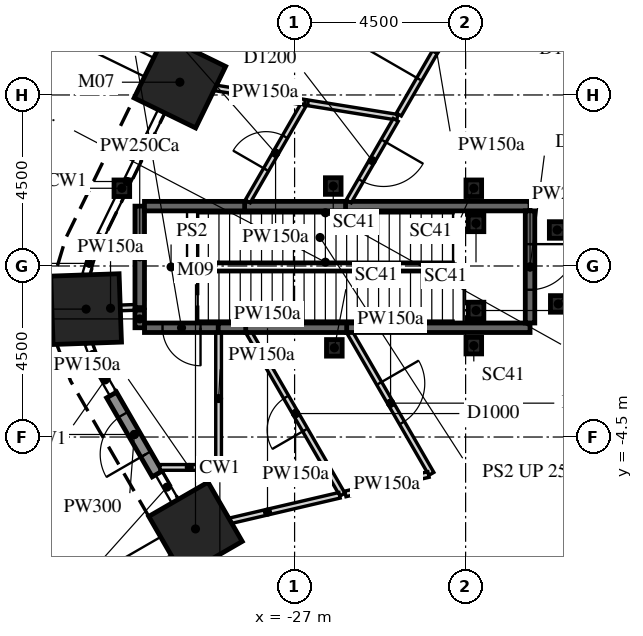
"""IFC4 building model, lengths in metres.
Left out: names, types, materials, properties, quantities, classifications, styles, units other than length and angle.
Written with IfcOpenShell. Run it as: python <this file> out.ifc"""

import sys

from ifc_helpers import new_model, si_unit, direction, frame, frame_2d, origin, origin_2d, place, context, subcontext, project, spatial, rectangle, i_section, extrude, element, fill, save


model = new_model("IFC4")
c1 = context("Model", 3, precision=1e-05, world=origin(), true_north=direction((0.0, 1.0)))
c2 = subcontext(c1, "Body", "Model", "MODEL_VIEW")
j1 = project(units=[si_unit("LENGTHUNIT", "METRE"), si_unit("PLANEANGLEUNIT", "RADIAN")], contexts=[c1])
p1 = place(None, origin())
s1 = spatial("IfcSite", under=j1, at=p1, CompositionType="ELEMENT")
p2 = place(p1, origin())
s2 = spatial("IfcBuilding", under=s1, at=p2, CompositionType="ELEMENT")
p3 = place(p2, origin())
s3 = spatial("IfcBuildingStorey", under=s2, at=p3, CompositionType="ELEMENT", Elevation=0.0)
for number, where, z_axis, x_axis in (
    (1, (-30.018, 4.836, -2.1), (0.0, 0.0, 1.0), (0.438, 0.899, 0.0)),
    (2, (-32.486, -1.135, -2.1), (0.0, 0.0, 1.0), (-0.035, 0.999, 0.0)),
    (3, (-29.608, -6.918, -2.1), (0.0, 0.0, 1.0), (-0.5, 0.866, 0.0)),
):
    element("IfcColumn", number, at=place(p3, frame(where, z_axis=z_axis, x_axis=x_axis)), inside=s3, PredefinedType="COLUMN", context=c2, shape_type="SweptSolid", body=[
        extrude(rectangle(XDim=1.8, YDim=1.8, at=origin_2d()), origin(), (0.0, 0.0, 1.0), 10.85),
    ])
for number, where, z_axis, x_axis in (
    (4, (-25.954, -2.154, -2.1), (0.0, 0.0, 1.0), (1.0, 0.0, 0.0)),
    (5, (-31.545, 2.045, -2.1), (0.0, 0.0, 1.0), (1.0, 0.0, 0.0)),
    (6, (-25.983, 2.104, -2.1), (0.0, 0.0, 1.0), (1.0, 0.0, 0.0)),
    (7, (-20.091, 0.948, -2.1), (0.0, 0.0, 1.0), (1.0, 0.0, 0.0)),
    (8, (-22.226, 1.121, -2.1), (0.0, 0.0, 1.0), (1.0, 0.0, 0.0)),
    (9, (-22.226, -1.171, -2.1), (0.0, 0.0, 1.0), (1.0, 0.0, 0.0)),
    (10, (-20.062, -0.998, -2.1), (0.0, 0.0, 1.0), (1.0, 0.0, 0.0)),
    (11, (-22.285, 2.045, -2.1), (0.0, 0.0, 1.0), (1.0, 0.0, 0.0)),
    (12, (-22.285, -2.095, -2.1), (0.0, 0.0, 1.0), (1.0, 0.0, 0.0)),
):
    element("IfcColumn", number, at=place(p3, frame(where, z_axis=z_axis, x_axis=x_axis)), inside=s3, PredefinedType="COLUMN", context=c2, shape_type="SweptSolid", body=[
        extrude(i_section(OverallWidth=0.412, OverallDepth=0.437, WebThickness=0.036, FlangeThickness=0.058, FilletRadius=0.015, at=origin_2d()), origin(), (0.0, 0.0, 1.0), 10.85),
    ])
p4 = place(p3, frame((-30.615, -5.472, 0.0), z_axis=(0.0, 0.0, 1.0), x_axis=(-0.500001309137, 0.866024647952, 0.0)))
e13 = element("IfcWall", 13, at=p4, inside=s3, PredefinedType="SOLIDWALL", context=c2, shape_type="SweptSolid", body=[
    extrude(rectangle(XDim=2.4, YDim=0.3, at=frame_2d((1.2, 0.0))), origin(), (0.0, 0.0, 1.0), 7.823),
])
p5 = place(p4, frame((0.6, 0.0, 0.0)))
e14 = element("IfcOpeningElement", 14, at=p5, cuts=e13, PredefinedType="OPENING", context=c2, shape_type="SweptSolid", body=[
    extrude(rectangle(XDim=1.2, YDim=2.1, at=frame_2d((0.6, 1.05))), frame((0.0, 0.16, 0.0), z_axis=(0.0, -1.0, 0.0), x_axis=(1.0, 0.0, 0.0)), (0.0, 0.0, 1.0), 0.32),
])
p6 = place(p3, frame((-32.486, -1.134, 0.0), z_axis=(0.0, 0.0, 1.0), x_axis=(0.99939717978, 0.034717100209, 0.0)))
e15 = element("IfcWall", 15, at=p6, inside=s3, PredefinedType="PARTITIONING", context=c2, shape_type="SweptSolid", body=[
    extrude(rectangle(XDim=1.287, YDim=0.15, at=frame_2d((0.644, 0.0))), origin(), (0.0, 0.0, 1.0), 8.75),
])
p7 = place(p3, frame((-29.0, -1.625, 0.0), z_axis=(0.0, 0.0, 1.0), x_axis=(-1.0, 0.0, 0.0)))
e16 = element("IfcWall", 16, at=p7, inside=s3, PredefinedType="PARTITIONING", context=c2, shape_type="SweptSolid", body=[
    extrude(rectangle(XDim=1.95, YDim=0.25, at=frame_2d((0.975, 0.0))), origin(), (0.0, 0.0, 1.0), 8.75),
])
p8 = place(p7, frame((0.475, 0.0, 0.0)))
e17 = element("IfcOpeningElement", 17, at=p8, cuts=e16, PredefinedType="OPENING", context=c2, shape_type="SweptSolid", body=[
    extrude(rectangle(XDim=1.0, YDim=2.1, at=frame_2d((0.5, 1.05))), frame((0.0, 0.135, 0.0), z_axis=(0.0, -1.0, 0.0), x_axis=(1.0, 0.0, 0.0)), (0.0, 0.0, 1.0), 0.27),
])
p9 = place(p3, frame((-31.075, -1.095, 0.0), z_axis=(0.0, 0.0, 1.0), x_axis=(0.0, 1.0, 0.0)))
e18 = element("IfcWall", 18, at=p9, inside=s3, PredefinedType="PARTITIONING", context=c2, shape_type="SweptSolid", body=[
    extrude(rectangle(XDim=2.67, YDim=0.25, at=frame_2d((1.335, 0.0))), origin(), (0.0, 0.0, 1.0), 8.75),
])
p10 = place(p3, frame((-31.075, -1.16, 0.0), z_axis=(0.0, 0.0, 1.0), x_axis=(0.0, -1.0, 0.0)))
e19 = element("IfcWall", 19, at=p10, inside=s3, PredefinedType="PARTITIONING", context=c2, shape_type="SweptSolid", body=[
    extrude(rectangle(XDim=0.465, YDim=0.25, at=frame_2d((0.232, 0.0))), origin(), (0.0, 0.0, 1.0), 8.75),
])
p11 = place(p3, frame((-30.95, 1.575, 0.0), z_axis=(0.0, 0.0, 1.0), x_axis=(1.0, 0.0, 0.0)))
e20 = element("IfcWall", 20, at=p11, inside=s3, PredefinedType="PARTITIONING", context=c2, shape_type="SweptSolid", body=[
    extrude(rectangle(XDim=2.657, YDim=0.25, at=frame_2d((1.329, 0.0))), origin(), (0.0, 0.0, 1.0), 8.75),
])
p12 = place(p3, frame((-30.018, 4.836, 0.0), z_axis=(0.0, 0.0, 1.0), x_axis=(0.987270453079, -0.159050471478, 0.0)))
e21 = element("IfcWall", 21, at=p12, inside=s3, PredefinedType="PARTITIONING", context=c2, shape_type="SweptSolid", body=[
    extrude(rectangle(XDim=3.333, YDim=0.15, at=frame_2d((1.666, 0.0))), origin(), (0.0, 0.0, 1.0), 8.75),
])
p13 = place(p3, frame((-29.0, -5.3, 0.0), z_axis=(0.0, 0.0, 1.0), x_axis=(-1.0, 0.0, 0.0)))
e22 = element("IfcWall", 22, at=p13, inside=s3, PredefinedType="PARTITIONING", context=c2, shape_type="SweptSolid", body=[
    extrude(rectangle(XDim=1.542, YDim=0.15, at=frame_2d((0.771, 0.0))), origin(), (0.0, 0.0, 1.0), 8.75),
])
p14 = place(p3, frame((-29.0, -1.75, 0.0), z_axis=(0.0, 0.0, 1.0), x_axis=(0.0, -1.0, 0.0)))
e23 = element("IfcWall", 23, at=p14, inside=s3, PredefinedType="PARTITIONING", context=c2, shape_type="SweptSolid", body=[
    extrude(rectangle(XDim=3.475, YDim=0.15, at=frame_2d((1.738, 0.0))), origin(), (0.0, 0.0, 1.0), 8.75),
])
p15 = place(p3, frame((-28.315, 1.575, 0.0), z_axis=(0.0, 0.0, 1.0), x_axis=(1.0, 0.0, 0.0)))
e24 = element("IfcWall", 24, at=p15, inside=s3, PredefinedType="PARTITIONING", context=c2, shape_type="SweptSolid", body=[
    extrude(rectangle(XDim=2.678, YDim=0.25, at=frame_2d((1.339, 0.0))), origin(), (0.0, 0.0, 1.0), 8.75),
])
p16 = place(p3, frame((-25.741, -6.015, 0.0), z_axis=(0.0, 0.0, 1.0), x_axis=(-0.500084325422, 0.865976713005, 0.0)))
e25 = element("IfcWall", 25, at=p16, inside=s3, PredefinedType="PARTITIONING", context=c2, shape_type="SweptSolid", body=[
    extrude(rectangle(XDim=4.925, YDim=0.15, at=frame_2d((2.462, 0.0))), origin(), (0.0, 0.0, 1.0), 8.75),
])
p17 = place(p16, frame((1.962, 0.0, 0.0)))
e26 = element("IfcOpeningElement", 26, at=p17, cuts=e25, PredefinedType="OPENING", context=c2, shape_type="SweptSolid", body=[
    extrude(rectangle(XDim=1.0, YDim=2.1, at=frame_2d((0.5, 1.05))), frame((0.0, 0.085, 0.0), z_axis=(0.0, -1.0, 0.0), x_axis=(1.0, 0.0, 0.0)), (0.0, 0.0, 1.0), 0.17),
])
p18 = place(p3, frame((-28.264, -1.625, 0.0), z_axis=(0.0, 0.0, 1.0), x_axis=(-1.0, 0.0, 0.0)))
e27 = element("IfcWall", 27, at=p18, inside=s3, PredefinedType="PARTITIONING", context=c2, shape_type="SweptSolid", body=[
    extrude(rectangle(XDim=0.746, YDim=0.25, at=frame_2d((0.373, 0.0))), origin(), (0.0, 0.0, 1.0), 8.75),
])
p19 = place(p3, frame((-28.233, 1.7, 0.0), z_axis=(0.0, 0.0, 1.0), x_axis=(0.500083180475, 0.865977374189, 0.0)))
e28 = element("IfcWall", 28, at=p19, inside=s3, PredefinedType="PARTITIONING", context=c2, shape_type="SweptSolid", body=[
    extrude(rectangle(XDim=2.929, YDim=0.15, at=frame_2d((1.465, 0.0))), origin(), (0.0, 0.0, 1.0), 8.75),
])
p20 = place(p19, frame((0.965, 0.0, 0.0)))
e29 = element("IfcOpeningElement", 29, at=p20, cuts=e28, PredefinedType="OPENING", context=c2, shape_type="SweptSolid", body=[
    extrude(rectangle(XDim=1.0, YDim=2.1, at=frame_2d((0.5, 1.05))), frame((0.0, 0.085, 0.0), z_axis=(0.0, -1.0, 0.0), x_axis=(1.0, 0.0, 0.0)), (0.0, 0.0, 1.0), 0.17),
])
p21 = place(p3, frame((-26.649, 4.293, 0.0), z_axis=(0.0, 0.0, 1.0), x_axis=(0.987239560751, -0.159242110287, 0.0)))
e30 = element("IfcWall", 30, at=p21, inside=s3, PredefinedType="PARTITIONING", context=c2, shape_type="SweptSolid", body=[
    extrude(rectangle(XDim=2.381, YDim=0.15, at=frame_2d((1.19, 0.0))), origin(), (0.0, 0.0, 1.0), 8.75),
])
p22 = place(p3, frame((-25.817, -6.033, 0.0), z_axis=(0.0, 0.0, 1.0), x_axis=(-0.973795851952, -0.227423918535, 0.0)))
e31 = element("IfcWall", 31, at=p22, inside=s3, PredefinedType="PARTITIONING", context=c2, shape_type="SweptSolid", body=[
    extrude(rectangle(XDim=3.893, YDim=0.15, at=frame_2d((1.946, 0.0))), origin(), (0.0, 0.0, 1.0), 8.75),
])
p23 = place(p3, frame((-25.659, 1.575, 0.0), z_axis=(0.0, 0.0, 1.0), x_axis=(1.0, 0.0, 0.0)))
e32 = element("IfcWall", 32, at=p23, inside=s3, PredefinedType="PARTITIONING", context=c2, shape_type="SweptSolid", body=[
    extrude(rectangle(XDim=4.854, YDim=0.25, at=frame_2d((2.427, 0.0))), origin(), (0.0, 0.0, 1.0), 8.75),
])
p24 = place(p3, frame((-25.548, -1.75, 0.0), z_axis=(0.0, 0.0, 1.0), x_axis=(0.500065367758, -0.865987660403, 0.0)))
e33 = element("IfcWall", 33, at=p24, inside=s3, PredefinedType="PARTITIONING", context=c2, shape_type="SweptSolid", body=[
    extrude(rectangle(XDim=4.293, YDim=0.15, at=frame_2d((2.147, 0.0))), origin(), (0.0, 0.0, 1.0), 8.75),
])
p25 = place(p24, frame((1.547, 0.0, 0.0)))
e34 = element("IfcOpeningElement", 34, at=p25, cuts=e33, PredefinedType="OPENING", context=c2, shape_type="SweptSolid", body=[
    extrude(rectangle(XDim=1.2, YDim=2.1, at=frame_2d((0.6, 1.05))), frame((0.0, 0.085, 0.0), z_axis=(0.0, -1.0, 0.0), x_axis=(1.0, 0.0, 0.0)), (0.0, 0.0, 1.0), 0.17),
])
p26 = place(p3, frame((-25.608, -1.625, 0.0), z_axis=(0.0, 0.0, 1.0), x_axis=(-1.0, 0.0, 0.0)))
e35 = element("IfcWall", 35, at=p26, inside=s3, PredefinedType="PARTITIONING", context=c2, shape_type="SweptSolid", body=[
    extrude(rectangle(XDim=2.678, YDim=0.25, at=frame_2d((1.339, 0.0))), origin(), (0.0, 0.0, 1.0), 8.75),
])
p27 = place(p3, frame((-24.338, 3.844, 0.0), z_axis=(0.0, 0.0, 1.0), x_axis=(-0.500188907164, -0.865916310708, 0.0)))
e36 = element("IfcWall", 36, at=p27, inside=s3, PredefinedType="PARTITIONING", context=c2, shape_type="SweptSolid", body=[
    extrude(rectangle(XDim=2.477, YDim=0.15, at=frame_2d((1.238, 0.0))), origin(), (0.0, 0.0, 1.0), 8.75),
])
p28 = place(p27, frame((0.638, 0.0, 0.0)))
e37 = element("IfcOpeningElement", 37, at=p28, cuts=e36, PredefinedType="OPENING", context=c2, shape_type="SweptSolid", body=[
    extrude(rectangle(XDim=1.2, YDim=2.1, at=frame_2d((0.6, 1.05))), frame((0.0, 0.085, 0.0), z_axis=(0.0, -1.0, 0.0), x_axis=(1.0, 0.0, 0.0)), (0.0, 0.0, 1.0), 0.17),
])
p29 = place(p3, frame((-23.477, -5.486, 0.0), z_axis=(0.0, 0.0, 1.0), x_axis=(-0.97376098573, -0.227573158942, 0.0)))
e38 = element("IfcWall", 38, at=p29, inside=s3, PredefinedType="PARTITIONING", context=c2, shape_type="SweptSolid", body=[
    extrude(rectangle(XDim=2.246, YDim=0.15, at=frame_2d((1.123, 0.0))), origin(), (0.0, 0.0, 1.0), 8.75),
])
p30 = place(p3, frame((-24.258, 3.983, 0.0), z_axis=(0.0, 0.0, 1.0), x_axis=(0.500095273167, 0.865970390808, 0.0)))
e39 = element("IfcWall", 39, at=p30, inside=s3, PredefinedType="PARTITIONING", context=c2, shape_type="SweptSolid", body=[
    extrude(rectangle(XDim=3.949, YDim=0.15, at=frame_2d((1.975, 0.0))), origin(), (0.0, 0.0, 1.0), 8.75),
])
p31 = place(p30, frame((1.074, 0.0, 0.0)))
e40 = element("IfcOpeningElement", 40, at=p31, cuts=e39, PredefinedType="OPENING", context=c2, shape_type="SweptSolid", body=[
    extrude(rectangle(XDim=1.8, YDim=2.1, at=frame_2d((0.9, 1.05))), frame((0.0, 0.085, 0.0), z_axis=(0.0, -1.0, 0.0), x_axis=(1.0, 0.0, 0.0)), (0.0, 0.0, 1.0), 0.17),
])
p32 = place(p3, frame((-20.805, -1.625, 0.0), z_axis=(0.0, 0.0, 1.0), x_axis=(-1.0, 0.0, 0.0)))
e41 = element("IfcWall", 41, at=p32, inside=s3, PredefinedType="PARTITIONING", context=c2, shape_type="SweptSolid", body=[
    extrude(rectangle(XDim=4.825, YDim=0.25, at=frame_2d((2.413, 0.0))), origin(), (0.0, 0.0, 1.0), 8.75),
])
p33 = place(p3, frame((-20.805, 1.45, 0.0), z_axis=(0.0, 0.0, 1.0), x_axis=(0.0, -1.0, 0.0)))
e42 = element("IfcWall", 42, at=p33, inside=s3, PredefinedType="PARTITIONING", context=c2, shape_type="SweptSolid", body=[
    extrude(rectangle(XDim=2.95, YDim=0.25, at=frame_2d((1.475, 0.0))), origin(), (0.0, 0.0, 1.0), 8.75),
])
p34 = place(p33, frame((0.875, 0.0, 0.0)))
e43 = element("IfcOpeningElement", 43, at=p34, cuts=e42, PredefinedType="OPENING", context=c2, shape_type="SweptSolid", body=[
    extrude(rectangle(XDim=1.2, YDim=2.1, at=frame_2d((0.6, 1.05))), frame((0.0, 0.135, 0.0), z_axis=(0.0, -1.0, 0.0), x_axis=(1.0, 0.0, 0.0)), (0.0, 0.0, 1.0), 0.27),
])
p35 = place(p5, frame((0.0, -0.025, 0.0)))
e44 = element("IfcDoor", 44, at=p35, inside=s3, OperationType="SINGLE_SWING_LEFT", PredefinedType="DOOR", context=c2, shape_type="SweptSolid", body=[
    extrude(rectangle(XDim=1.2, YDim=2.1, at=frame_2d((0.6, 1.05))), frame((0.0, 0.025, 0.0), z_axis=(0.0, -1.0, 0.0), x_axis=(1.0, 0.0, 0.0)), (0.0, 0.0, 1.0), 0.05),
])
fill(e14, e44)
p36 = place(p8, origin())
e45 = element("IfcDoor", 45, at=p36, inside=s3, OperationType="SINGLE_SWING_RIGHT", PredefinedType="DOOR", context=c2, shape_type="SweptSolid", body=[
    extrude(rectangle(XDim=1.0, YDim=2.1, at=frame_2d((0.5, 1.05))), frame((0.0, 0.025, 0.0), z_axis=(0.0, -1.0, 0.0), x_axis=(1.0, 0.0, 0.0)), (0.0, 0.0, 1.0), 0.05),
])
fill(e17, e45)
p37 = place(p17, origin())
e46 = element("IfcDoor", 46, at=p37, inside=s3, OperationType="SINGLE_SWING_LEFT", PredefinedType="DOOR", context=c2, shape_type="SweptSolid", body=[
    extrude(rectangle(XDim=1.0, YDim=2.1, at=frame_2d((0.5, 1.05))), frame((0.0, 0.025, 0.0), z_axis=(0.0, -1.0, 0.0), x_axis=(1.0, 0.0, 0.0)), (0.0, 0.0, 1.0), 0.05),
])
fill(e26, e46)
p38 = place(p20, origin())
e47 = element("IfcDoor", 47, at=p38, inside=s3, OperationType="SINGLE_SWING_RIGHT", PredefinedType="DOOR", context=c2, shape_type="SweptSolid", body=[
    extrude(rectangle(XDim=1.0, YDim=2.1, at=frame_2d((0.5, 1.05))), frame((0.0, 0.025, 0.0), z_axis=(0.0, -1.0, 0.0), x_axis=(1.0, 0.0, 0.0)), (0.0, 0.0, 1.0), 0.05),
])
fill(e29, e47)
p39 = place(p25, origin())
e48 = element("IfcDoor", 48, at=p39, inside=s3, OperationType="SINGLE_SWING_LEFT", PredefinedType="DOOR", context=c2, shape_type="SweptSolid", body=[
    extrude(rectangle(XDim=1.2, YDim=2.1, at=frame_2d((0.6, 1.05))), frame((0.0, 0.025, 0.0), z_axis=(0.0, -1.0, 0.0), x_axis=(1.0, 0.0, 0.0)), (0.0, 0.0, 1.0), 0.05),
])
fill(e34, e48)
p40 = place(p28, origin())
e49 = element("IfcDoor", 49, at=p40, inside=s3, OperationType="SINGLE_SWING_RIGHT", PredefinedType="DOOR", context=c2, shape_type="SweptSolid", body=[
    extrude(rectangle(XDim=1.2, YDim=2.1, at=frame_2d((0.6, 1.05))), frame((0.0, 0.025, 0.0), z_axis=(0.0, -1.0, 0.0), x_axis=(1.0, 0.0, 0.0)), (0.0, 0.0, 1.0), 0.05),
])
fill(e37, e49)
p41 = place(p31, origin())
e50 = element("IfcDoor", 50, at=p41, inside=s3, OperationType="DOUBLE_DOOR_SINGLE_SWING", PredefinedType="DOOR", context=c2, shape_type="SweptSolid", body=[
    extrude(rectangle(XDim=1.8, YDim=2.1, at=frame_2d((0.9, 1.05))), frame((0.0, 0.025, 0.0), z_axis=(0.0, -1.0, 0.0), x_axis=(1.0, 0.0, 0.0)), (0.0, 0.0, 1.0), 0.05),
])
fill(e40, e50)
p42 = place(p34, origin())
e51 = element("IfcDoor", 51, at=p42, inside=s3, OperationType="SINGLE_SWING_LEFT", PredefinedType="DOOR", context=c2, shape_type="SweptSolid", body=[
    extrude(rectangle(XDim=1.2, YDim=2.1, at=frame_2d((0.6, 1.05))), frame((0.0, 0.025, 0.0), z_axis=(0.0, -1.0, 0.0), x_axis=(1.0, 0.0, 0.0)), (0.0, 0.0, 1.0), 0.05),
])
fill(e43, e51)
save(model, sys.argv[1])
